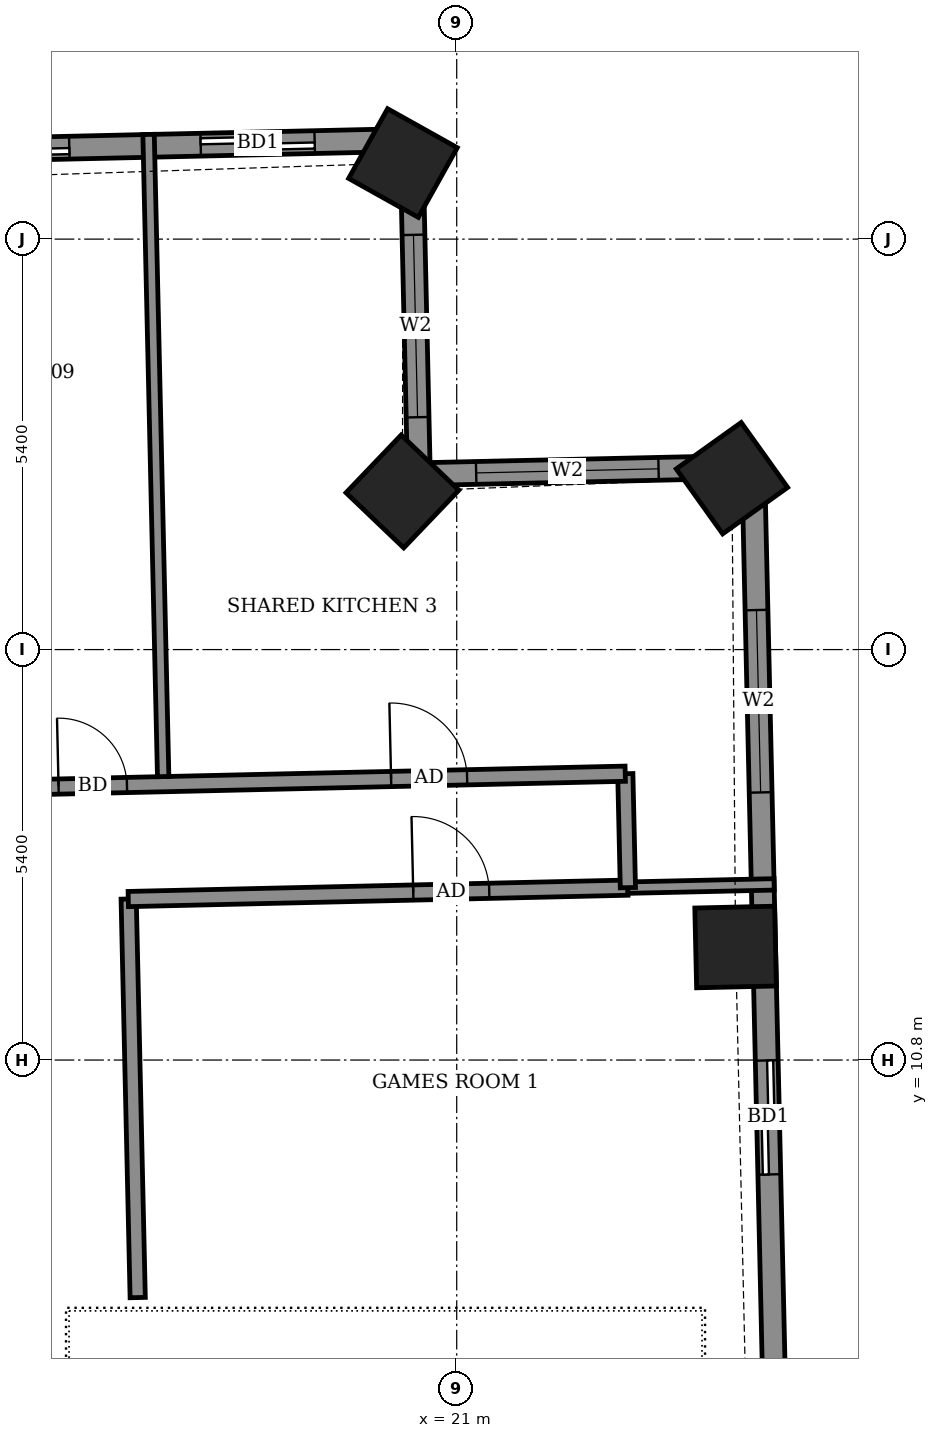
"""IFC4 building model, lengths in metres.
Left out: names, types, materials, properties, quantities, classifications, styles, units other than length and angle.
Written with IfcOpenShell. Run it as: python <this file> out.ifc"""

import sys

from ifc_helpers import new_model, si_unit, direction, frame, frame_2d, origin, origin_2d, place, context, subcontext, project, spatial, rectangle, extrude, element, fill, save


model = new_model("IFC4")
c1 = context("Model", 3, precision=1e-05, world=origin(), true_north=direction((0.0, 1.0)))
c2 = subcontext(c1, "Body", "Model", "MODEL_VIEW")
j1 = project(units=[si_unit("LENGTHUNIT", "METRE"), si_unit("PLANEANGLEUNIT", "RADIAN")], contexts=[c1])
p1 = place(None, origin())
s1 = spatial("IfcSite", under=j1, at=p1, CompositionType="ELEMENT")
p2 = place(p1, origin())
s2 = spatial("IfcBuilding", under=s1, at=p2, CompositionType="ELEMENT")
p3 = place(p2, frame((0.0, 0.0, 241.9)))
s3 = spatial("IfcBuildingStorey", under=s2, at=p3, CompositionType="ELEMENT", Elevation=241.9)
for number, where, z_axis, x_axis in (
    (1, (24.669, 12.287, -0.55), (0.0, 0.0, 1.0), (-0.023, 1.0, 0.0)),
    (2, (24.621, 18.455, -0.55), (0.0, 0.0, 1.0), (-0.581, 0.814, 0.0)),
    (3, (20.286, 18.281, -0.55), (0.0, 0.0, 1.0), (-0.723, 0.691, 0.0)),
    (4, (20.293, 22.601, -0.55), (0.0, 0.0, 1.0), (-0.873, 0.488, 0.0)),
):
    element("IfcColumn", number, at=place(p3, frame(where, z_axis=z_axis, x_axis=x_axis)), inside=s3, PredefinedType="COLUMN", context=c2, shape_type="SweptSolid", body=[
        extrude(rectangle(XDim=1.05, YDim=1.05, at=origin_2d()), origin(), (0.0, 0.0, 1.0), 3.6),
    ])
p4 = place(p3, frame((25.203, 5.31, 0.0), z_axis=(0.0, 0.0, 1.0), x_axis=(-0.022708061432, 0.999742138727, 0.0)))
e5 = element("IfcWall", 5, at=p4, inside=s3, PredefinedType="SOLIDWALL", context=c2, shape_type="SweptSolid", body=[
    extrude(rectangle(XDim=13.299, YDim=0.3, at=frame_2d((6.65, 0.0))), origin(), (0.0, 0.0, 1.0), 2.55),
])
p5 = place(p4, frame((3.986, 0.0, 0.0)))
e6 = element("IfcOpeningElement", 6, at=p5, cuts=e5, PredefinedType="OPENING", context=c2, shape_type="SweptSolid", body=[
    extrude(rectangle(XDim=1.5, YDim=2.4, at=frame_2d((0.75, 1.2))), frame((0.0, 0.16, 0.0), z_axis=(0.0, -1.0, 0.0), x_axis=(1.0, 0.0, 0.0)), (0.0, 0.0, 1.0), 0.32),
])
p6 = place(p4, frame((9.013, 0.0, 0.9)))
e7 = element("IfcOpeningElement", 7, at=p6, cuts=e5, PredefinedType="OPENING", context=c2, shape_type="SweptSolid", body=[
    extrude(rectangle(XDim=2.4, YDim=1.5, at=frame_2d((1.2, 0.75))), frame((0.0, 0.16, 0.0), z_axis=(0.0, -1.0, 0.0), x_axis=(1.0, 0.0, 0.0)), (0.0, 0.0, 1.0), 0.32),
])
p7 = place(p3, frame((24.901, 18.606, 0.0), z_axis=(0.0, 0.0, 1.0), x_axis=(-0.999747476176, -0.022471846368, 0.0)))
e8 = element("IfcWall", 8, at=p7, inside=s3, PredefinedType="SOLIDWALL", context=c2, shape_type="SweptSolid", body=[
    extrude(rectangle(XDim=4.4, YDim=0.3, at=frame_2d((2.2, 0.0))), origin(), (0.0, 0.0, 1.0), 2.55),
])
p8 = place(p7, frame((1.246, 0.0, 0.9)))
e9 = element("IfcOpeningElement", 9, at=p8, cuts=e8, PredefinedType="OPENING", context=c2, shape_type="SweptSolid", body=[
    extrude(rectangle(XDim=2.4, YDim=1.5, at=frame_2d((1.2, 0.75))), frame((0.0, 0.16, 0.0), z_axis=(0.0, -1.0, 0.0), x_axis=(1.0, 0.0, 0.0)), (0.0, 0.0, 1.0), 0.32),
])
p9 = place(p3, frame((20.502, 18.507, 0.0), z_axis=(0.0, 0.0, 1.0), x_axis=(-0.02247683371, 0.999747364061, 0.0)))
e10 = element("IfcWall", 10, at=p9, inside=s3, PredefinedType="SOLIDWALL", context=c2, shape_type="SweptSolid", body=[
    extrude(rectangle(XDim=4.399, YDim=0.3, at=frame_2d((2.2, 0.0))), origin(), (0.0, 0.0, 1.0), 2.55),
])
p10 = place(p9, frame((0.75, 0.0, 0.9)))
e11 = element("IfcOpeningElement", 11, at=p10, cuts=e10, PredefinedType="OPENING", context=c2, shape_type="SweptSolid", body=[
    extrude(rectangle(XDim=2.4, YDim=1.5, at=frame_2d((1.2, 0.75))), frame((0.0, 0.16, 0.0), z_axis=(0.0, -1.0, 0.0), x_axis=(1.0, 0.0, 0.0)), (0.0, 0.0, 1.0), 0.32),
])
p11 = place(p3, frame((20.403, 22.905, 0.0), z_axis=(0.0, 0.0, 1.0), x_axis=(-0.99974298964, -0.022670568288, 0.0)))
e12 = element("IfcWall", 12, at=p11, inside=s3, PredefinedType="SOLIDWALL", context=c2, shape_type="SweptSolid", body=[
    extrude(rectangle(XDim=44.509, YDim=0.3, at=frame_2d((22.254, 0.0))), origin(), (0.0, 0.0, 1.0), 2.5),
])
p12 = place(p11, frame((1.272, 0.0, 0.0)))
e13 = element("IfcOpeningElement", 13, at=p12, cuts=e12, PredefinedType="OPENING", context=c2, shape_type="SweptSolid", body=[
    extrude(rectangle(XDim=1.5, YDim=2.4, at=frame_2d((0.75, 1.2))), frame((0.0, 0.16, 0.0), z_axis=(0.0, -1.0, 0.0), x_axis=(1.0, 0.0, 0.0)), (0.0, 0.0, 1.0), 0.32),
])
p13 = place(p11, frame((4.501, 0.0, 0.0)))
e14 = element("IfcOpeningElement", 14, at=p13, cuts=e12, PredefinedType="OPENING", context=c2, shape_type="SweptSolid", body=[
    extrude(rectangle(XDim=1.5, YDim=2.4, at=frame_2d((0.75, 1.2))), frame((0.0, 0.16, 0.0), z_axis=(0.0, -1.0, 0.0), x_axis=(1.0, 0.0, 0.0)), (0.0, 0.0, 1.0), 0.32),
])
p14 = place(p11, frame((9.058, 0.0, 0.0)))
e15 = element("IfcOpeningElement", 15, at=p14, cuts=e12, PredefinedType="OPENING", context=c2, shape_type="SweptSolid", body=[
    extrude(rectangle(XDim=1.5, YDim=2.4, at=frame_2d((0.75, 1.2))), frame((0.0, 0.16, 0.0), z_axis=(0.0, -1.0, 0.0), x_axis=(1.0, 0.0, 0.0)), (0.0, 0.0, 1.0), 0.32),
])
p15 = place(p11, frame((12.46, 0.0, 0.0)))
e16 = element("IfcOpeningElement", 16, at=p15, cuts=e12, PredefinedType="OPENING", context=c2, shape_type="SweptSolid", body=[
    extrude(rectangle(XDim=1.5, YDim=2.4, at=frame_2d((0.75, 1.2))), frame((0.0, 0.16, 0.0), z_axis=(0.0, -1.0, 0.0), x_axis=(1.0, 0.0, 0.0)), (0.0, 0.0, 1.0), 0.32),
])
p16 = place(p11, frame((17.533, 0.0, 0.0)))
e17 = element("IfcOpeningElement", 17, at=p16, cuts=e12, PredefinedType="OPENING", context=c2, shape_type="SweptSolid", body=[
    extrude(rectangle(XDim=1.5, YDim=2.4, at=frame_2d((0.75, 1.2))), frame((0.0, 0.16, 0.0), z_axis=(0.0, -1.0, 0.0), x_axis=(1.0, 0.0, 0.0)), (0.0, 0.0, 1.0), 0.32),
])
p17 = place(p11, frame((22.993, 0.0, 0.0)))
e18 = element("IfcOpeningElement", 18, at=p17, cuts=e12, PredefinedType="OPENING", context=c2, shape_type="SweptSolid", body=[
    extrude(rectangle(XDim=1.2, YDim=2.4, at=frame_2d((0.6, 1.2))), frame((0.0, 0.16, 0.0), z_axis=(0.0, -1.0, 0.0), x_axis=(1.0, 0.0, 0.0)), (0.0, 0.0, 1.0), 0.32),
])
p18 = place(p11, frame((26.033, 0.0, 0.0)))
e19 = element("IfcOpeningElement", 19, at=p18, cuts=e12, PredefinedType="OPENING", context=c2, shape_type="SweptSolid", body=[
    extrude(rectangle(XDim=1.5, YDim=2.4, at=frame_2d((0.75, 1.2))), frame((0.0, 0.16, 0.0), z_axis=(0.0, -1.0, 0.0), x_axis=(1.0, 0.0, 0.0)), (0.0, 0.0, 1.0), 0.32),
])
p19 = place(p11, frame((30.827, 0.0, 0.0)))
e20 = element("IfcOpeningElement", 20, at=p19, cuts=e12, PredefinedType="OPENING", context=c2, shape_type="SweptSolid", body=[
    extrude(rectangle(XDim=1.5, YDim=2.4, at=frame_2d((0.75, 1.2))), frame((0.0, 0.16, 0.0), z_axis=(0.0, -1.0, 0.0), x_axis=(1.0, 0.0, 0.0)), (0.0, 0.0, 1.0), 0.32),
])
p20 = place(p11, frame((34.286, 0.0, 0.0)))
e21 = element("IfcOpeningElement", 21, at=p20, cuts=e12, PredefinedType="OPENING", context=c2, shape_type="SweptSolid", body=[
    extrude(rectangle(XDim=1.5, YDim=2.4, at=frame_2d((0.75, 1.2))), frame((0.0, 0.16, 0.0), z_axis=(0.0, -1.0, 0.0), x_axis=(1.0, 0.0, 0.0)), (0.0, 0.0, 1.0), 0.32),
])
p21 = place(p11, frame((38.811, 0.0, 0.0)))
e22 = element("IfcOpeningElement", 22, at=p21, cuts=e12, PredefinedType="OPENING", context=c2, shape_type="SweptSolid", body=[
    extrude(rectangle(XDim=1.5, YDim=2.4, at=frame_2d((0.75, 1.2))), frame((0.0, 0.16, 0.0), z_axis=(0.0, -1.0, 0.0), x_axis=(1.0, 0.0, 0.0)), (0.0, 0.0, 1.0), 0.32),
])
p22 = place(p11, frame((42.148, 0.0, 0.9)))
e23 = element("IfcOpeningElement", 23, at=p22, cuts=e12, PredefinedType="OPENING", context=c2, shape_type="SweptSolid", body=[
    extrude(rectangle(XDim=1.2, YDim=1.5, at=frame_2d((0.6, 0.75))), frame((0.0, 0.16, 0.0), z_axis=(0.0, -1.0, 0.0), x_axis=(1.0, 0.0, 0.0)), (0.0, 0.0, 1.0), 0.32),
])
p23 = place(p3, frame((16.803, 7.675, 0.0), z_axis=(0.0, 0.0, 1.0), x_axis=(-0.022667483124, 0.999743059595, 0.0)))
e24 = element("IfcWall", 24, at=p23, inside=s3, PredefinedType="PARTITIONING", context=c2, shape_type="SweptSolid", body=[
    extrude(rectangle(XDim=5.245, YDim=0.2, at=frame_2d((2.623, 0.0))), origin(), (0.0, 0.0, 1.0), 3.05),
])
p24 = place(p3, frame((16.679, 12.918, 0.0), z_axis=(0.0, 0.0, 1.0), x_axis=(0.999739125025, 0.022840356696, 0.0)))
e25 = element("IfcWall", 25, at=p24, inside=s3, PredefinedType="PARTITIONING", context=c2, shape_type="SweptSolid", body=[
    extrude(rectangle(XDim=6.574, YDim=0.2, at=frame_2d((3.287, 0.0))), origin(), (0.0, 0.0, 1.0), 3.05),
])
p25 = place(p24, frame((3.75, 0.0, 0.0)))
e26 = element("IfcOpeningElement", 26, at=p25, cuts=e25, PredefinedType="OPENING", context=c2, shape_type="SweptSolid", body=[
    extrude(rectangle(XDim=1.0, YDim=2.1, at=frame_2d((0.5, 1.05))), frame((0.0, 0.11, 0.0), z_axis=(0.0, -1.0, 0.0), x_axis=(1.0, 0.0, 0.0)), (0.0, 0.0, 1.0), 0.22),
])
p26 = place(p3, frame((23.251, 13.068, 0.0), z_axis=(0.0, 0.0, 1.0), x_axis=(0.999750982596, 0.022315304114, 0.0)))
e27 = element("IfcWall", 27, at=p26, inside=s3, PredefinedType="PARTITIONING", context=c2, shape_type="SweptSolid", body=[
    extrude(rectangle(XDim=1.926, YDim=0.15, at=frame_2d((0.963, 0.0))), origin(), (0.0, 0.0, 1.0), 2.55),
])
p27 = place(p3, frame((23.252, 13.068, 0.0), z_axis=(0.0, 0.0, 1.0), x_axis=(-0.022636322434, 0.999743765625, 0.0)))
e28 = element("IfcWall", 28, at=p27, inside=s3, PredefinedType="PARTITIONING", context=c2, shape_type="SweptSolid", body=[
    extrude(rectangle(XDim=1.499, YDim=0.2, at=frame_2d((0.75, 0.0))), origin(), (0.0, 0.0, 1.0), 3.05),
])
p28 = place(p3, frame((-27.652, 13.413, 0.0), z_axis=(0.0, 0.0, 1.0), x_axis=(0.999742864992, 0.022676064408, 0.0)))
e29 = element("IfcWall", 29, at=p28, inside=s3, PredefinedType="PARTITIONING", context=c2, shape_type="SweptSolid", body=[
    extrude(rectangle(XDim=50.882, YDim=0.2, at=frame_2d((25.441, 0.0))), origin(), (0.0, 0.0, 1.0), 3.05),
])
p29 = place(p28, frame((47.801, 0.0, 0.0)))
e30 = element("IfcOpeningElement", 30, at=p29, cuts=e29, PredefinedType="OPENING", context=c2, shape_type="SweptSolid", body=[
    extrude(rectangle(XDim=1.0, YDim=2.1, at=frame_2d((0.5, 1.05))), frame((0.0, 0.11, 0.0), z_axis=(0.0, -1.0, 0.0), x_axis=(1.0, 0.0, 0.0)), (0.0, 0.0, 1.0), 0.22),
])
p30 = place(p28, frame((43.425, 0.0, 0.0)))
e31 = element("IfcOpeningElement", 31, at=p30, cuts=e29, PredefinedType="OPENING", context=c2, shape_type="SweptSolid", body=[
    extrude(rectangle(XDim=0.9, YDim=2.1, at=frame_2d((0.45, 1.05))), frame((0.0, 0.11, 0.0), z_axis=(0.0, -1.0, 0.0), x_axis=(1.0, 0.0, 0.0)), (0.0, 0.0, 1.0), 0.22),
])
p31 = place(p28, frame((36.8, 0.0, 0.0)))
e32 = element("IfcOpeningElement", 32, at=p31, cuts=e29, PredefinedType="OPENING", context=c2, shape_type="SweptSolid", body=[
    extrude(rectangle(XDim=0.9, YDim=2.1, at=frame_2d((0.45, 1.05))), frame((0.0, 0.11, 0.0), z_axis=(0.0, -1.0, 0.0), x_axis=(1.0, 0.0, 0.0)), (0.0, 0.0, 1.0), 0.22),
])
p32 = place(p28, frame((34.975, 0.0, 0.0)))
e33 = element("IfcOpeningElement", 33, at=p32, cuts=e29, PredefinedType="OPENING", context=c2, shape_type="SweptSolid", body=[
    extrude(rectangle(XDim=0.9, YDim=2.1, at=frame_2d((0.45, 1.05))), frame((0.0, 0.11, 0.0), z_axis=(0.0, -1.0, 0.0), x_axis=(1.0, 0.0, 0.0)), (0.0, 0.0, 1.0), 0.22),
])
p33 = place(p28, frame((28.325, 0.0, 0.0)))
e34 = element("IfcOpeningElement", 34, at=p33, cuts=e29, PredefinedType="OPENING", context=c2, shape_type="SweptSolid", body=[
    extrude(rectangle(XDim=0.9, YDim=2.1, at=frame_2d((0.45, 1.05))), frame((0.0, 0.11, 0.0), z_axis=(0.0, -1.0, 0.0), x_axis=(1.0, 0.0, 0.0)), (0.0, 0.0, 1.0), 0.22),
])
p34 = place(p28, frame((26.475, 0.0, 0.0)))
e35 = element("IfcOpeningElement", 35, at=p34, cuts=e29, PredefinedType="OPENING", context=c2, shape_type="SweptSolid", body=[
    extrude(rectangle(XDim=0.9, YDim=2.1, at=frame_2d((0.45, 1.05))), frame((0.0, 0.11, 0.0), z_axis=(0.0, -1.0, 0.0), x_axis=(1.0, 0.0, 0.0)), (0.0, 0.0, 1.0), 0.22),
])
p35 = place(p28, frame((19.825, 0.0, 0.0)))
e36 = element("IfcOpeningElement", 36, at=p35, cuts=e29, PredefinedType="OPENING", context=c2, shape_type="SweptSolid", body=[
    extrude(rectangle(XDim=0.9, YDim=2.1, at=frame_2d((0.45, 1.05))), frame((0.0, 0.11, 0.0), z_axis=(0.0, -1.0, 0.0), x_axis=(1.0, 0.0, 0.0)), (0.0, 0.0, 1.0), 0.22),
])
p36 = place(p28, frame((17.975, 0.0, 0.0)))
e37 = element("IfcOpeningElement", 37, at=p36, cuts=e29, PredefinedType="OPENING", context=c2, shape_type="SweptSolid", body=[
    extrude(rectangle(XDim=0.9, YDim=2.1, at=frame_2d((0.45, 1.05))), frame((0.0, 0.11, 0.0), z_axis=(0.0, -1.0, 0.0), x_axis=(1.0, 0.0, 0.0)), (0.0, 0.0, 1.0), 0.22),
])
p37 = place(p28, frame((11.325, 0.0, 0.0)))
e38 = element("IfcOpeningElement", 38, at=p37, cuts=e29, PredefinedType="OPENING", context=c2, shape_type="SweptSolid", body=[
    extrude(rectangle(XDim=0.9, YDim=2.1, at=frame_2d((0.45, 1.05))), frame((0.0, 0.11, 0.0), z_axis=(0.0, -1.0, 0.0), x_axis=(1.0, 0.0, 0.0)), (0.0, 0.0, 1.0), 0.22),
])
p38 = place(p28, frame((9.475, 0.0, 0.0)))
e39 = element("IfcOpeningElement", 39, at=p38, cuts=e29, PredefinedType="OPENING", context=c2, shape_type="SweptSolid", body=[
    extrude(rectangle(XDim=0.9, YDim=2.1, at=frame_2d((0.45, 1.05))), frame((0.0, 0.11, 0.0), z_axis=(0.0, -1.0, 0.0), x_axis=(1.0, 0.0, 0.0)), (0.0, 0.0, 1.0), 0.22),
])
p39 = place(p28, frame((2.772, 0.0, 0.0)))
e40 = element("IfcOpeningElement", 40, at=p39, cuts=e29, PredefinedType="OPENING", context=c2, shape_type="SweptSolid", body=[
    extrude(rectangle(XDim=1.0, YDim=2.1, at=frame_2d((0.5, 1.05))), frame((0.0, 0.11, 0.0), z_axis=(0.0, -1.0, 0.0), x_axis=(1.0, 0.0, 0.0)), (0.0, 0.0, 1.0), 0.22),
])
p40 = place(p3, frame((17.138, 14.529, 0.0), z_axis=(0.0, 0.0, 1.0), x_axis=(-0.022708935798, 0.999742118866, 0.0)))
e41 = element("IfcWall", 41, at=p40, inside=s3, PredefinedType="PARTITIONING", context=c2, shape_type="SweptSolid", body=[
    extrude(rectangle(XDim=8.45, YDim=0.15, at=frame_2d((4.225, 0.0))), origin(), (0.0, 0.0, 1.0), 2.5),
])
p41 = place(p5, origin())
e42 = element("IfcDoor", 42, at=p41, inside=s3, OperationType="SLIDING_TO_LEFT", PredefinedType="DOOR", context=c2, shape_type="SweptSolid", body=[
    extrude(rectangle(XDim=1.5, YDim=2.4, at=frame_2d((0.75, 1.2))), frame((0.0, 0.025, 0.0), z_axis=(0.0, -1.0, 0.0), x_axis=(1.0, 0.0, 0.0)), (0.0, 0.0, 1.0), 0.05),
])
fill(e6, e42)
p42 = place(p6, origin())
e43 = element("IfcWindow", 43, at=p42, inside=s3, PartitioningType="DOUBLE_PANEL_VERTICAL", PredefinedType="WINDOW", context=c2, shape_type="SweptSolid", body=[
    extrude(rectangle(XDim=2.4, YDim=1.5, at=frame_2d((1.2, 0.75))), frame((0.0, 0.03, 0.0), z_axis=(0.0, -1.0, 0.0), x_axis=(1.0, 0.0, 0.0)), (0.0, 0.0, 1.0), 0.06),
])
fill(e7, e43)
p43 = place(p8, origin())
e44 = element("IfcWindow", 44, at=p43, inside=s3, PartitioningType="DOUBLE_PANEL_VERTICAL", PredefinedType="WINDOW", context=c2, shape_type="SweptSolid", body=[
    extrude(rectangle(XDim=2.4, YDim=1.5, at=frame_2d((1.2, 0.75))), frame((0.0, 0.03, 0.0), z_axis=(0.0, -1.0, 0.0), x_axis=(1.0, 0.0, 0.0)), (0.0, 0.0, 1.0), 0.06),
])
fill(e9, e44)
p44 = place(p10, origin())
e45 = element("IfcWindow", 45, at=p44, inside=s3, PartitioningType="DOUBLE_PANEL_VERTICAL", PredefinedType="WINDOW", context=c2, shape_type="SweptSolid", body=[
    extrude(rectangle(XDim=2.4, YDim=1.5, at=frame_2d((1.2, 0.75))), frame((0.0, 0.03, 0.0), z_axis=(0.0, -1.0, 0.0), x_axis=(1.0, 0.0, 0.0)), (0.0, 0.0, 1.0), 0.06),
])
fill(e11, e45)
p45 = place(p12, origin())
e46 = element("IfcDoor", 46, at=p45, inside=s3, OperationType="SLIDING_TO_LEFT", PredefinedType="DOOR", context=c2, shape_type="SweptSolid", body=[
    extrude(rectangle(XDim=1.5, YDim=2.4, at=frame_2d((0.75, 1.2))), frame((0.0, 0.025, 0.0), z_axis=(0.0, -1.0, 0.0), x_axis=(1.0, 0.0, 0.0)), (0.0, 0.0, 1.0), 0.05),
])
fill(e13, e46)
p46 = place(p13, origin())
e47 = element("IfcDoor", 47, at=p46, inside=s3, OperationType="SLIDING_TO_LEFT", PredefinedType="DOOR", context=c2, shape_type="SweptSolid", body=[
    extrude(rectangle(XDim=1.5, YDim=2.4, at=frame_2d((0.75, 1.2))), frame((0.0, 0.025, 0.0), z_axis=(0.0, -1.0, 0.0), x_axis=(1.0, 0.0, 0.0)), (0.0, 0.0, 1.0), 0.05),
])
fill(e14, e47)
p47 = place(p25, origin())
e48 = element("IfcDoor", 48, at=p47, inside=s3, OperationType="SINGLE_SWING_RIGHT", PredefinedType="DOOR", context=c2, shape_type="SweptSolid", body=[
    extrude(rectangle(XDim=1.0, YDim=2.1, at=frame_2d((0.5, 1.05))), frame((0.0, 0.025, 0.0), z_axis=(0.0, -1.0, 0.0), x_axis=(1.0, 0.0, 0.0)), (0.0, 0.0, 1.0), 0.05),
])
fill(e26, e48)
p48 = place(p29, origin())
e49 = element("IfcDoor", 49, at=p48, inside=s3, OperationType="SINGLE_SWING_LEFT", PredefinedType="DOOR", context=c2, shape_type="SweptSolid", body=[
    extrude(rectangle(XDim=1.0, YDim=2.1, at=frame_2d((0.5, 1.05))), frame((0.0, 0.025, 0.0), z_axis=(0.0, -1.0, 0.0), x_axis=(1.0, 0.0, 0.0)), (0.0, 0.0, 1.0), 0.05),
])
fill(e30, e49)
p49 = place(p30, origin())
e50 = element("IfcDoor", 50, at=p49, inside=s3, OperationType="SINGLE_SWING_LEFT", PredefinedType="DOOR", context=c2, shape_type="SweptSolid", body=[
    extrude(rectangle(XDim=0.9, YDim=2.1, at=frame_2d((0.45, 1.05))), frame((0.0, 0.025, 0.0), z_axis=(0.0, -1.0, 0.0), x_axis=(1.0, 0.0, 0.0)), (0.0, 0.0, 1.0), 0.05),
])
fill(e31, e50)
save(model, sys.argv[1])
